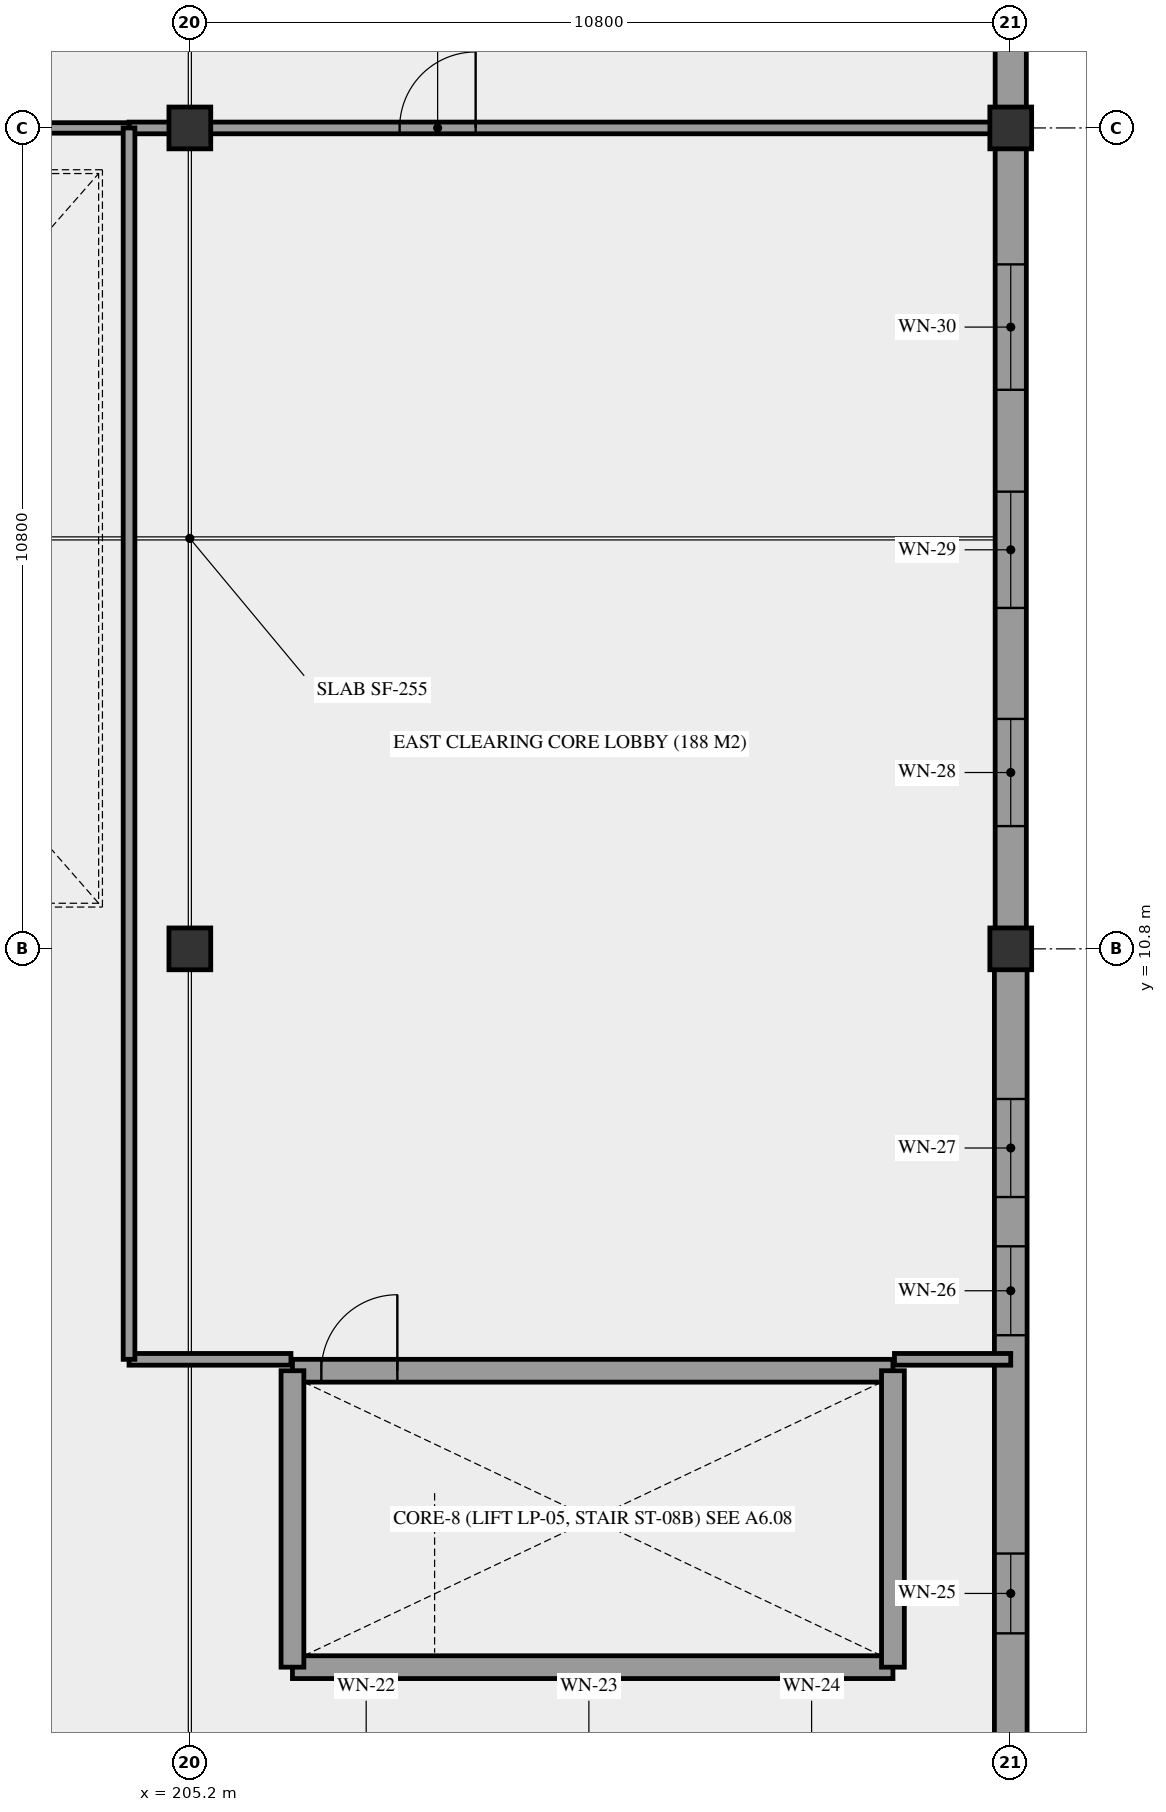
"""IFC4 building model, lengths in metres.
Left out: names, types, materials, properties, quantities, classifications, styles, units other than length and angle.
Written with IfcOpenShell. Run it as: python <this file> out.ifc"""

import sys

from ifc_helpers import new_model, si_unit, direction, frame, frame_2d, origin, origin_2d, place, context, subcontext, project, spatial, rectangle, extrude, element, fill, save


model = new_model("IFC4")
c1 = context("Model", 3, precision=1e-05, world=origin(), true_north=direction((0.0, 1.0)))
c2 = subcontext(c1, "Body", "Model", "MODEL_VIEW")
j1 = project(units=[si_unit("LENGTHUNIT", "METRE"), si_unit("PLANEANGLEUNIT", "RADIAN")], contexts=[c1])
p1 = place(None, origin())
s1 = spatial("IfcSite", under=j1, at=p1, CompositionType="ELEMENT")
p2 = place(p1, origin())
s2 = spatial("IfcBuilding", under=s1, at=p2, CompositionType="ELEMENT")
p3 = place(p2, frame((0.0, 0.0, 10.08)))
s3 = spatial("IfcBuildingStorey", under=s2, at=p3, CompositionType="ELEMENT", Elevation=10.08)
for number, where, z_axis, x_axis in (
    (1, (205.2, 10.8, 0.0), (0.0, 0.0, 1.0), (1.0, 0.0, 0.0)),
    (2, (205.2, 21.6, 0.0), (0.0, 0.0, 1.0), (1.0, 0.0, 0.0)),
    (3, (216.0, 10.8, 0.0), (0.0, 0.0, 1.0), (1.0, 0.0, 0.0)),
    (4, (216.0, 21.6, 0.0), (0.0, 0.0, 1.0), (1.0, 0.0, 0.0)),
):
    element("IfcColumn", number, at=place(p3, frame(where, z_axis=z_axis, x_axis=x_axis)), inside=s3, PredefinedType="COLUMN", context=c2, shape_type="SweptSolid", body=[
        extrude(rectangle(XDim=0.55, YDim=0.55, at=origin_2d()), origin(), (0.0, 0.0, 1.0), 4.68),
    ])
p4 = place(p3, frame((216.0, 0.27, 0.0), z_axis=(0.0, 0.0, 1.0), x_axis=(0.0, 1.0, 0.0)))
e5 = element("IfcWall", 5, at=p4, inside=s3, PredefinedType="STANDARD", context=c2, shape_type="SweptSolid", body=[
    extrude(rectangle(XDim=10.26, YDim=0.43, at=frame_2d((5.13, 0.0))), origin(), (0.0, 0.0, 1.0), 3.53),
])
p5 = place(p4, frame((1.525, 0.0, 0.95)))
e6 = element("IfcOpeningElement", 6, at=p5, cuts=e5, PredefinedType="OPENING", context=c2, shape_type="SweptSolid", body=[
    extrude(rectangle(XDim=1.05, YDim=1.35, at=frame_2d((0.525, 0.675))), frame((0.0, 0.225, 0.0), z_axis=(0.0, -1.0, 0.0), x_axis=(1.0, 0.0, 0.0)), (0.0, 0.0, 1.0), 0.45),
])
p6 = place(p4, frame((5.447, 0.0, 0.95)))
e7 = element("IfcOpeningElement", 7, at=p6, cuts=e5, PredefinedType="OPENING", context=c2, shape_type="SweptSolid", body=[
    extrude(rectangle(XDim=1.17, YDim=1.35, at=frame_2d((0.585, 0.675))), frame((0.0, 0.225, 0.0), z_axis=(0.0, -1.0, 0.0), x_axis=(1.0, 0.0, 0.0)), (0.0, 0.0, 1.0), 0.45),
])
p7 = place(p4, frame((7.265, 0.0, 0.95)))
e8 = element("IfcOpeningElement", 8, at=p7, cuts=e5, PredefinedType="OPENING", context=c2, shape_type="SweptSolid", body=[
    extrude(rectangle(XDim=1.29, YDim=1.35, at=frame_2d((0.645, 0.675))), frame((0.0, 0.225, 0.0), z_axis=(0.0, -1.0, 0.0), x_axis=(1.0, 0.0, 0.0)), (0.0, 0.0, 1.0), 0.45),
])
p8 = place(p3, frame((216.0, 11.07, 0.0), z_axis=(0.0, 0.0, 1.0), x_axis=(0.0, 1.0, 0.0)))
e9 = element("IfcWall", 9, at=p8, inside=s3, PredefinedType="STANDARD", context=c2, shape_type="SweptSolid", body=[
    extrude(rectangle(XDim=10.26, YDim=0.41, at=frame_2d((5.13, 0.0))), origin(), (0.0, 0.0, 1.0), 3.53),
])
p9 = place(p8, frame((1.345, 0.0, 0.95)))
e10 = element("IfcOpeningElement", 10, at=p9, cuts=e9, PredefinedType="OPENING", context=c2, shape_type="SweptSolid", body=[
    extrude(rectangle(XDim=1.41, YDim=1.35, at=frame_2d((0.705, 0.675))), frame((0.0, 0.215, 0.0), z_axis=(0.0, -1.0, 0.0), x_axis=(1.0, 0.0, 0.0)), (0.0, 0.0, 1.0), 0.43),
])
p10 = place(p8, frame((4.215, 0.0, 0.95)))
e11 = element("IfcOpeningElement", 11, at=p10, cuts=e9, PredefinedType="OPENING", context=c2, shape_type="SweptSolid", body=[
    extrude(rectangle(XDim=1.53, YDim=1.35, at=frame_2d((0.765, 0.675))), frame((0.0, 0.215, 0.0), z_axis=(0.0, -1.0, 0.0), x_axis=(1.0, 0.0, 0.0)), (0.0, 0.0, 1.0), 0.43),
])
p11 = place(p8, frame((7.085, 0.0, 0.95)))
e12 = element("IfcOpeningElement", 12, at=p11, cuts=e9, PredefinedType="OPENING", context=c2, shape_type="SweptSolid", body=[
    extrude(rectangle(XDim=1.65, YDim=1.35, at=frame_2d((0.825, 0.675))), frame((0.0, 0.215, 0.0), z_axis=(0.0, -1.0, 0.0), x_axis=(1.0, 0.0, 0.0)), (0.0, 0.0, 1.0), 0.43),
])
p12 = place(p3, frame((216.0, 21.87, 0.0), z_axis=(0.0, 0.0, 1.0), x_axis=(0.0, 1.0, 0.0)))
e13 = element("IfcWall", 13, at=p12, inside=s3, PredefinedType="STANDARD", context=c2, shape_type="SweptSolid", body=[
    extrude(rectangle(XDim=10.26, YDim=0.41, at=frame_2d((5.13, 0.0))), origin(), (0.0, 0.0, 1.0), 3.53),
])
p13 = place(p12, frame((1.465, 0.0, 0.95)))
e14 = element("IfcOpeningElement", 14, at=p13, cuts=e13, PredefinedType="OPENING", context=c2, shape_type="SweptSolid", body=[
    extrude(rectangle(XDim=1.17, YDim=1.5, at=frame_2d((0.585, 0.75))), frame((0.0, 0.215, 0.0), z_axis=(0.0, -1.0, 0.0), x_axis=(1.0, 0.0, 0.0)), (0.0, 0.0, 1.0), 0.43),
])
p14 = place(p12, frame((4.335, 0.0, 0.95)))
e15 = element("IfcOpeningElement", 15, at=p14, cuts=e13, PredefinedType="OPENING", context=c2, shape_type="SweptSolid", body=[
    extrude(rectangle(XDim=1.29, YDim=1.5, at=frame_2d((0.645, 0.75))), frame((0.0, 0.215, 0.0), z_axis=(0.0, -1.0, 0.0), x_axis=(1.0, 0.0, 0.0)), (0.0, 0.0, 1.0), 0.43),
])
p15 = place(p12, frame((7.205, 0.0, 0.95)))
e16 = element("IfcOpeningElement", 16, at=p15, cuts=e13, PredefinedType="OPENING", context=c2, shape_type="SweptSolid", body=[
    extrude(rectangle(XDim=1.41, YDim=1.5, at=frame_2d((0.705, 0.75))), frame((0.0, 0.215, 0.0), z_axis=(0.0, -1.0, 0.0), x_axis=(1.0, 0.0, 0.0)), (0.0, 0.0, 1.0), 0.43),
])
p16 = place(p3, frame((206.55, 1.35, 0.0), z_axis=(0.0, 0.0, 1.0), x_axis=(1.0, 0.0, 0.0)))
e17 = element("IfcWall", 17, at=p16, inside=s3, PredefinedType="SHEAR", context=c2, shape_type="SweptSolid", body=[
    extrude(rectangle(XDim=7.9, YDim=0.3, at=frame_2d((3.95, 0.0))), origin(), (0.0, 0.0, 1.0), 4.68),
])
p17 = place(p3, frame((206.55, 5.25, 0.0), z_axis=(0.0, 0.0, 1.0), x_axis=(1.0, 0.0, 0.0)))
e18 = element("IfcWall", 18, at=p17, inside=s3, PredefinedType="SHEAR", context=c2, shape_type="SweptSolid", body=[
    extrude(rectangle(XDim=7.9, YDim=0.3, at=frame_2d((3.95, 0.0))), origin(), (0.0, 0.0, 1.0), 4.68),
])
p18 = place(p17, frame((0.38, 0.0, 0.0)))
e19 = element("IfcOpeningElement", 19, at=p18, cuts=e18, PredefinedType="OPENING", context=c2, shape_type="SweptSolid", body=[
    extrude(rectangle(XDim=1.0, YDim=2.15, at=frame_2d((0.5, 1.075))), frame((0.0, 0.16, 0.0), z_axis=(0.0, -1.0, 0.0), x_axis=(1.0, 0.0, 0.0)), (0.0, 0.0, 1.0), 0.32),
])
for number, where, z_axis, x_axis in (
    (20, (206.55, 1.35, 0.0), (0.0, 0.0, 1.0), (0.0, 1.0, 0.0)),
    (21, (214.45, 1.35, 0.0), (0.0, 0.0, 1.0), (0.0, 1.0, 0.0)),
):
    element("IfcWall", number, at=place(p3, frame(where, z_axis=z_axis, x_axis=x_axis)), inside=s3, PredefinedType="SHEAR", context=c2, shape_type="SweptSolid", body=[
        extrude(rectangle(XDim=3.9, YDim=0.3, at=frame_2d((1.95, 0.0))), origin(), (0.0, 0.0, 1.0), 4.68),
    ])
p19 = place(p3, frame((204.4, 21.6, 0.0), z_axis=(0.0, 0.0, 1.0), x_axis=(1.0, 0.0, 0.0)))
e22 = element("IfcWall", 22, at=p19, inside=s3, PredefinedType="PARTITIONING", context=c2, shape_type="SweptSolid", body=[
    extrude(rectangle(XDim=11.6, YDim=0.154, at=frame_2d((5.8, 0.0))), origin(), (0.0, 0.0, 1.0), 3.23),
])
p20 = place(p19, frame((3.56, 0.0, 0.0)))
e23 = element("IfcOpeningElement", 23, at=p20, cuts=e22, PredefinedType="OPENING", context=c2, shape_type="SweptSolid", body=[
    extrude(rectangle(XDim=1.0, YDim=2.15, at=frame_2d((0.5, 1.075))), frame((0.0, 0.087, 0.0), z_axis=(0.0, -1.0, 0.0), x_axis=(1.0, 0.0, 0.0)), (0.0, 0.0, 1.0), 0.174),
])
p21 = place(p3, frame((195.2, 21.6, 0.0), z_axis=(0.0, 0.0, 1.0), x_axis=(1.0, 0.0, 0.0)))
e24 = element("IfcWall", 24, at=p21, inside=s3, PredefinedType="PARTITIONING", context=c2, shape_type="SweptSolid", body=[
    extrude(rectangle(XDim=9.2, YDim=0.138, at=frame_2d((4.6, 0.0))), origin(), (0.0, 0.0, 1.0), 3.23),
])
p22 = place(p3, frame((204.4, 5.4, 0.0), z_axis=(0.0, 0.0, 1.0), x_axis=(1.0, 0.0, 0.0)))
e25 = element("IfcWall", 25, at=p22, inside=s3, PredefinedType="PARTITIONING", context=c2, shape_type="SweptSolid", body=[
    extrude(rectangle(XDim=2.13, YDim=0.154, at=frame_2d((1.065, 0.0))), origin(), (0.0, 0.0, 1.0), 3.23),
])
p23 = place(p3, frame((214.47, 5.4, 0.0), z_axis=(0.0, 0.0, 1.0), x_axis=(1.0, 0.0, 0.0)))
e26 = element("IfcWall", 26, at=p23, inside=s3, PredefinedType="PARTITIONING", context=c2, shape_type="SweptSolid", body=[
    extrude(rectangle(XDim=1.53, YDim=0.154, at=frame_2d((0.765, 0.0))), origin(), (0.0, 0.0, 1.0), 3.23),
])
p24 = place(p3, frame((204.4, 5.4, 0.0), z_axis=(0.0, 0.0, 1.0), x_axis=(0.0, 1.0, 0.0)))
e27 = element("IfcWall", 27, at=p24, inside=s3, PredefinedType="PARTITIONING", context=c2, shape_type="SweptSolid", body=[
    extrude(rectangle(XDim=16.2, YDim=0.154, at=frame_2d((8.1, 0.0))), origin(), (0.0, 0.0, 1.0), 3.23),
])
p25 = place(p3, frame((216.0, 10.55, 0.0), z_axis=(0.0, 0.0, 1.0), x_axis=(0.0, 1.0, 0.0)))
e28 = element("IfcWall", 28, at=p25, inside=s3, PredefinedType="PARTITIONING", context=c2, shape_type="SweptSolid", body=[
    extrude(rectangle(XDim=0.5, YDim=0.168, at=frame_2d((0.25, 0.0))), origin(), (0.0, 0.0, 1.0), 3.23),
])
p26 = place(p5, frame((1.05, 0.0, 0.0), z_axis=(0.0, 0.0, 1.0), x_axis=(-1.0, 0.0, 0.0)))
e29 = element("IfcWindow", 29, at=p26, inside=s3, PartitioningType="SINGLE_PANEL", PredefinedType="WINDOW", context=c2, shape_type="SweptSolid", body=[
    extrude(rectangle(XDim=1.05, YDim=1.35, at=frame_2d((0.525, 0.675))), frame((0.0, 0.03, 0.0), z_axis=(0.0, -1.0, 0.0), x_axis=(1.0, 0.0, 0.0)), (0.0, 0.0, 1.0), 0.06),
])
fill(e6, e29)
p27 = place(p6, frame((1.17, 0.0, 0.0), z_axis=(0.0, 0.0, 1.0), x_axis=(-1.0, 0.0, 0.0)))
e30 = element("IfcWindow", 30, at=p27, inside=s3, PartitioningType="SINGLE_PANEL", PredefinedType="WINDOW", context=c2, shape_type="SweptSolid", body=[
    extrude(rectangle(XDim=1.17, YDim=1.35, at=frame_2d((0.585, 0.675))), frame((0.0, 0.03, 0.0), z_axis=(0.0, -1.0, 0.0), x_axis=(1.0, 0.0, 0.0)), (0.0, 0.0, 1.0), 0.06),
])
fill(e7, e30)
p28 = place(p7, frame((1.29, 0.0, 0.0), z_axis=(0.0, 0.0, 1.0), x_axis=(-1.0, 0.0, 0.0)))
e31 = element("IfcWindow", 31, at=p28, inside=s3, PartitioningType="SINGLE_PANEL", PredefinedType="WINDOW", context=c2, shape_type="SweptSolid", body=[
    extrude(rectangle(XDim=1.29, YDim=1.35, at=frame_2d((0.645, 0.675))), frame((0.0, 0.03, 0.0), z_axis=(0.0, -1.0, 0.0), x_axis=(1.0, 0.0, 0.0)), (0.0, 0.0, 1.0), 0.06),
])
fill(e8, e31)
p29 = place(p9, frame((1.41, 0.0, 0.0), z_axis=(0.0, 0.0, 1.0), x_axis=(-1.0, 0.0, 0.0)))
e32 = element("IfcWindow", 32, at=p29, inside=s3, PartitioningType="SINGLE_PANEL", PredefinedType="WINDOW", context=c2, shape_type="SweptSolid", body=[
    extrude(rectangle(XDim=1.41, YDim=1.35, at=frame_2d((0.705, 0.675))), frame((0.0, 0.03, 0.0), z_axis=(0.0, -1.0, 0.0), x_axis=(1.0, 0.0, 0.0)), (0.0, 0.0, 1.0), 0.06),
])
fill(e10, e32)
p30 = place(p10, frame((1.53, 0.0, 0.0), z_axis=(0.0, 0.0, 1.0), x_axis=(-1.0, 0.0, 0.0)))
e33 = element("IfcWindow", 33, at=p30, inside=s3, PartitioningType="SINGLE_PANEL", PredefinedType="WINDOW", context=c2, shape_type="SweptSolid", body=[
    extrude(rectangle(XDim=1.53, YDim=1.35, at=frame_2d((0.765, 0.675))), frame((0.0, 0.03, 0.0), z_axis=(0.0, -1.0, 0.0), x_axis=(1.0, 0.0, 0.0)), (0.0, 0.0, 1.0), 0.06),
])
fill(e11, e33)
p31 = place(p11, frame((1.65, 0.0, 0.0), z_axis=(0.0, 0.0, 1.0), x_axis=(-1.0, 0.0, 0.0)))
e34 = element("IfcWindow", 34, at=p31, inside=s3, PartitioningType="SINGLE_PANEL", PredefinedType="WINDOW", context=c2, shape_type="SweptSolid", body=[
    extrude(rectangle(XDim=1.65, YDim=1.35, at=frame_2d((0.825, 0.675))), frame((0.0, 0.03, 0.0), z_axis=(0.0, -1.0, 0.0), x_axis=(1.0, 0.0, 0.0)), (0.0, 0.0, 1.0), 0.06),
])
fill(e12, e34)
p32 = place(p18, origin())
e35 = element("IfcDoor", 35, at=p32, inside=s3, OperationType="SINGLE_SWING_RIGHT", PredefinedType="DOOR", context=c2, shape_type="SweptSolid", body=[
    extrude(rectangle(XDim=1.0, YDim=2.15, at=frame_2d((0.5, 1.075))), frame((0.0, 0.025, 0.0), z_axis=(0.0, -1.0, 0.0), x_axis=(1.0, 0.0, 0.0)), (0.0, 0.0, 1.0), 0.05),
])
fill(e19, e35)
p33 = place(p20, frame((1.0, 0.0, 0.0), z_axis=(0.0, 0.0, 1.0), x_axis=(-1.0, 0.0, 0.0)))
e36 = element("IfcDoor", 36, at=p33, inside=s3, OperationType="SINGLE_SWING_RIGHT", PredefinedType="DOOR", context=c2, shape_type="SweptSolid", body=[
    extrude(rectangle(XDim=1.0, YDim=2.15, at=frame_2d((0.5, 1.075))), frame((0.0, 0.025, 0.0), z_axis=(0.0, -1.0, 0.0), x_axis=(1.0, 0.0, 0.0)), (0.0, 0.0, 1.0), 0.05),
])
fill(e23, e36)
save(model, sys.argv[1])
